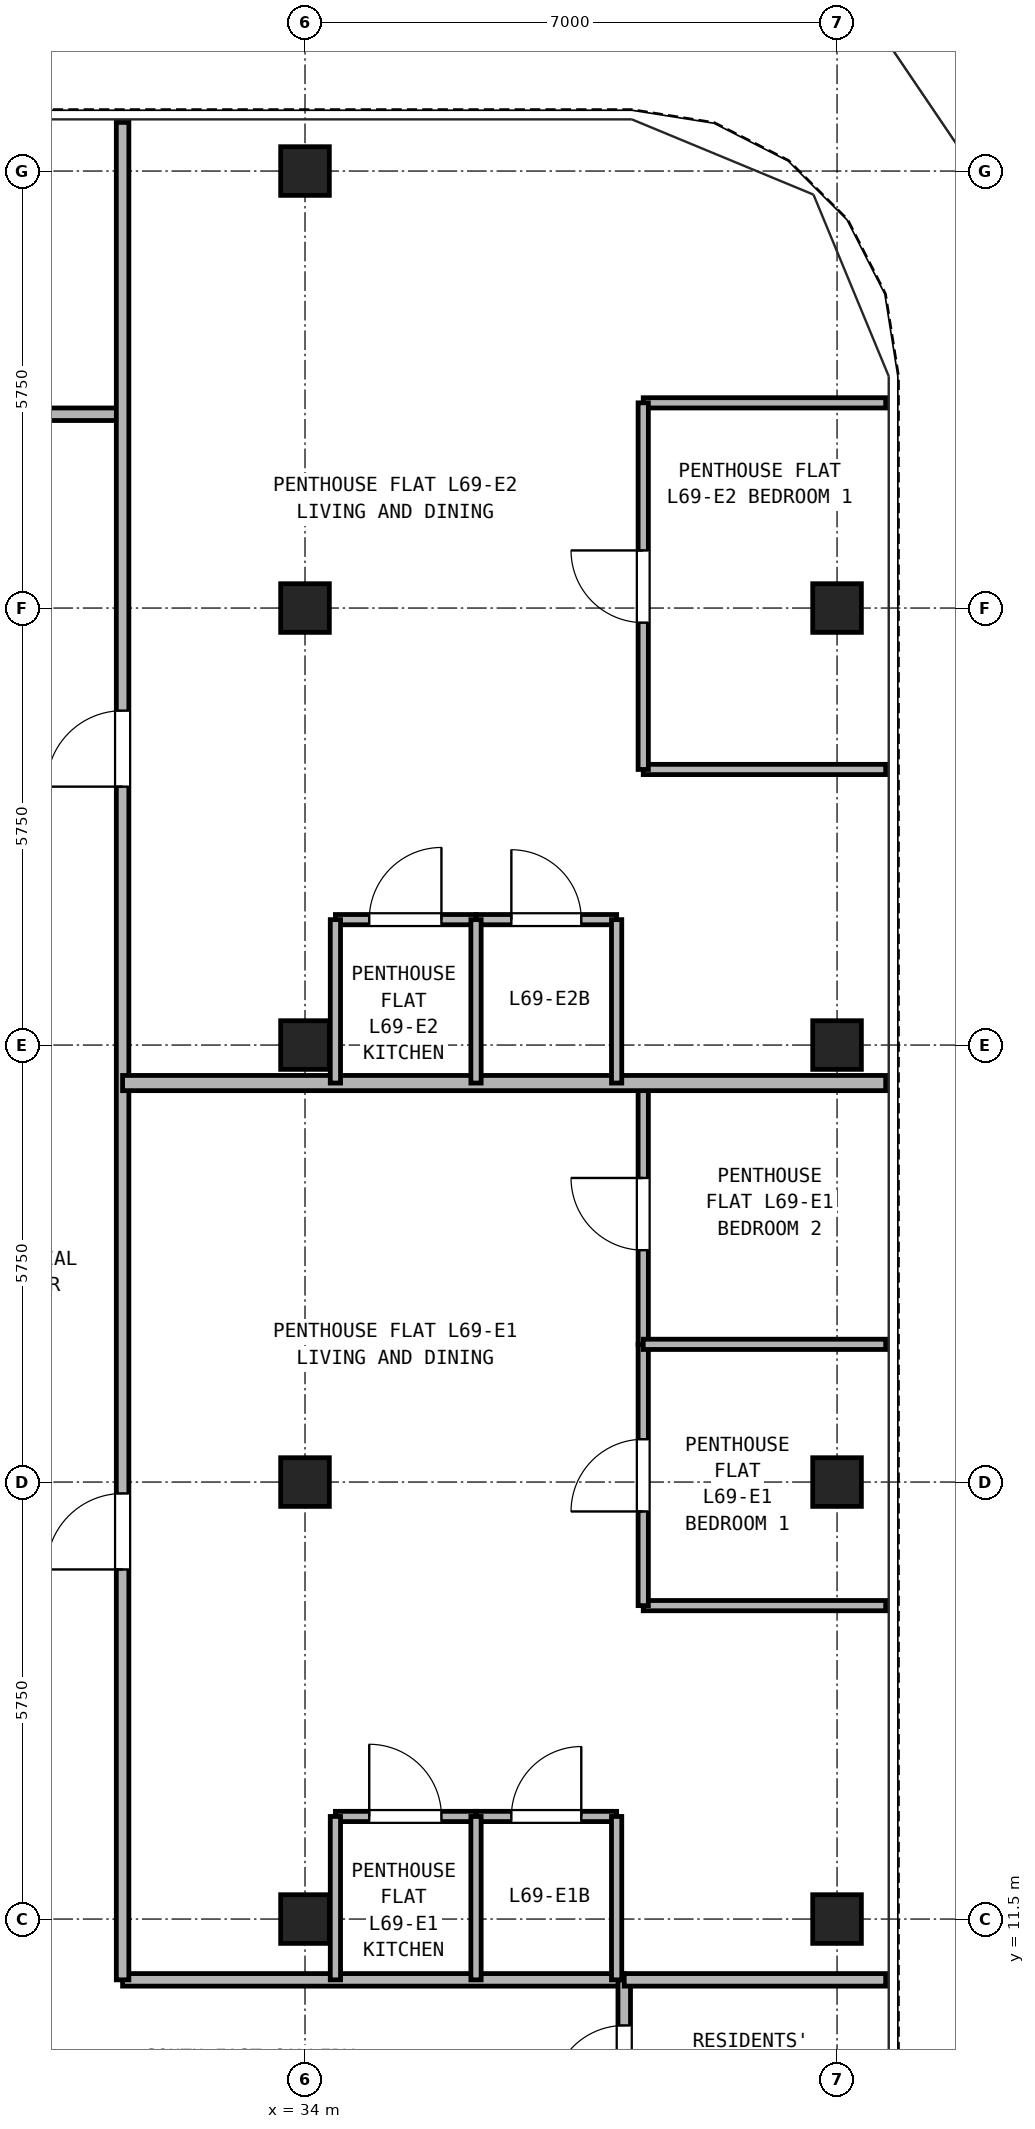
"""IFC4 building model, lengths in metres.
Left out: names, types, materials, properties, quantities, classifications, styles, units other than length and angle.
Written with IfcOpenShell. Run it as: python <this file> out.ifc"""

import sys

from ifc_helpers import new_model, si_unit, direction, frame, frame_2d, origin, origin_2d, place, context, subcontext, project, spatial, rectangle, hollow_rectangle, extrude, source, transform, mapped, element, fill, save


model = new_model("IFC4")
c1 = context("Model", 3, precision=1e-05, world=origin(), true_north=direction((0.0, 1.0)))
c2 = subcontext(c1, "Body", "Model", "MODEL_VIEW")
j1 = project(units=[si_unit("LENGTHUNIT", "METRE"), si_unit("PLANEANGLEUNIT", "RADIAN")], contexts=[c1])
p1 = place(None, origin())
s1 = spatial("IfcSite", under=j1, at=p1, CompositionType="ELEMENT")
p2 = place(p1, origin())
s2 = spatial("IfcBuilding", under=s1, at=p2, CompositionType="ELEMENT")
p3 = place(p2, frame((0.0, 0.0, 242.5)))
s3 = spatial("IfcBuildingStorey", under=s2, at=p3, CompositionType="ELEMENT", Elevation=242.5)
m1 = source(origin(), c2, "Body", "SweptSolid", [
    extrude(hollow_rectangle(XDim=0.64, YDim=0.64, WallThickness=0.035, at=origin_2d()), origin(), (0.0, 0.0, 1.0), 2.98),
])
for number, where, z_axis, x_axis in (
    (1, (34.0, 34.5, 0.0), (0.0, 0.0, 1.0), (1.0, 0.0, 0.0)),
    (2, (41.0, 11.5, 0.0), (0.0, 0.0, 1.0), (1.0, 0.0, 0.0)),
    (3, (41.0, 17.25, 0.0), (0.0, 0.0, 1.0), (1.0, 0.0, 0.0)),
    (4, (41.0, 23.0, 0.0), (0.0, 0.0, 1.0), (1.0, 0.0, 0.0)),
    (5, (41.0, 28.75, 0.0), (0.0, 0.0, 1.0), (1.0, 0.0, 0.0)),
    (6, (34.0, 11.5, 0.0), (0.0, 0.0, 1.0), (1.0, 0.0, 0.0)),
    (7, (34.0, 17.25, 0.0), (0.0, 0.0, 1.0), (1.0, 0.0, 0.0)),
    (8, (34.0, 23.0, 0.0), (0.0, 0.0, 1.0), (1.0, 0.0, 0.0)),
    (9, (34.0, 28.75, 0.0), (0.0, 0.0, 1.0), (1.0, 0.0, 0.0)),
):
    element("IfcColumn", number, at=place(p3, frame(where, z_axis=z_axis, x_axis=x_axis)), inside=s3, PredefinedType="COLUMN", context=c2, shape_type="MappedRepresentation", body=[
        mapped(m1, transform((0.0, 0.0, 0.0), x_axis=(1.0, 0.0, 0.0), y_axis=(0.0, 1.0, 0.0), z_axis=(0.0, 0.0, 1.0), scale=1.0)),
    ])
p4 = place(p3, frame((31.6, 10.7, 0.0), z_axis=(0.0, 0.0, 1.0), x_axis=(1.0, 0.0, 0.0)))
e10 = element("IfcWall", 10, at=p4, inside=s3, PredefinedType="PARTITIONING", context=c2, shape_type="SweptSolid", body=[
    extrude(rectangle(XDim=6.6, YDim=0.165, at=frame_2d((3.3, 0.0))), origin(), (0.0, 0.0, 1.0), 2.98),
])
p5 = place(p3, frame((38.2, 8.7, 0.0), z_axis=(0.0, 0.0, 1.0), x_axis=(0.0, 1.0, 0.0)))
e11 = element("IfcWall", 11, at=p5, inside=s3, PredefinedType="PARTITIONING", context=c2, shape_type="SweptSolid", body=[
    extrude(rectangle(XDim=2.0, YDim=0.165, at=frame_2d((1.0, 0.0))), origin(), (0.0, 0.0, 1.0), 2.98),
])
p6 = place(p5, frame((0.45, 0.0, 0.0)))
e12 = element("IfcOpeningElement", 12, at=p6, cuts=e11, PredefinedType="OPENING", context=c2, shape_type="SweptSolid", body=[
    extrude(rectangle(XDim=0.95, YDim=2.15, at=frame_2d((0.475, 1.075))), frame((0.0, 0.093, 0.0), z_axis=(0.0, -1.0, 0.0), x_axis=(1.0, 0.0, 0.0)), (0.0, 0.0, 1.0), 0.185),
])
p7 = place(p3, frame((15.4, 31.3, 0.0), z_axis=(0.0, 0.0, 1.0), x_axis=(1.0, 0.0, 0.0)))
e13 = element("IfcWall", 13, at=p7, inside=s3, PredefinedType="PARTITIONING", context=c2, shape_type="SweptSolid", body=[
    extrude(rectangle(XDim=16.2, YDim=0.165, at=frame_2d((8.1, 0.0))), origin(), (0.0, 0.0, 1.0), 2.98),
])
p8 = place(p7, frame((2.8, 0.0, 0.0)))
e14 = element("IfcOpeningElement", 14, at=p8, cuts=e13, PredefinedType="OPENING", context=c2, shape_type="SweptSolid", body=[
    extrude(rectangle(XDim=0.95, YDim=2.15, at=frame_2d((0.475, 1.075))), frame((0.0, 0.093, 0.0), z_axis=(0.0, -1.0, 0.0), x_axis=(1.0, 0.0, 0.0)), (0.0, 0.0, 1.0), 0.185),
])
p9 = place(p7, frame((8.15, 0.0, 0.0)))
e15 = element("IfcOpeningElement", 15, at=p9, cuts=e13, PredefinedType="OPENING", context=c2, shape_type="SweptSolid", body=[
    extrude(rectangle(XDim=0.95, YDim=2.15, at=frame_2d((0.475, 1.075))), frame((0.0, 0.093, 0.0), z_axis=(0.0, -1.0, 0.0), x_axis=(1.0, 0.0, 0.0)), (0.0, 0.0, 1.0), 0.185),
])
p10 = place(p7, frame((12.95, 0.0, 0.0)))
e16 = element("IfcOpeningElement", 16, at=p10, cuts=e13, PredefinedType="OPENING", context=c2, shape_type="SweptSolid", body=[
    extrude(rectangle(XDim=0.92, YDim=2.1, at=frame_2d((0.46, 1.05))), frame((0.0, 0.093, 0.0), z_axis=(0.0, -1.0, 0.0), x_axis=(1.0, 0.0, 0.0)), (0.0, 0.0, 1.0), 0.185),
])
p11 = place(p3, frame((31.6, 10.7, 0.0), z_axis=(0.0, 0.0, 1.0), x_axis=(0.0, 1.0, 0.0)))
e17 = element("IfcWall", 17, at=p11, inside=s3, PredefinedType="PARTITIONING", context=c2, shape_type="SweptSolid", body=[
    extrude(rectangle(XDim=24.44, YDim=0.165, at=frame_2d((12.22, 0.0))), origin(), (0.0, 0.0, 1.0), 2.98),
])
p12 = place(p11, frame((5.4, 0.0, 0.0)))
e18 = element("IfcOpeningElement", 18, at=p12, cuts=e17, PredefinedType="OPENING", context=c2, shape_type="SweptSolid", body=[
    extrude(rectangle(XDim=1.0, YDim=2.15, at=frame_2d((0.5, 1.075))), frame((0.0, 0.093, 0.0), z_axis=(0.0, -1.0, 0.0), x_axis=(1.0, 0.0, 0.0)), (0.0, 0.0, 1.0), 0.185),
])
p13 = place(p11, frame((15.7, 0.0, 0.0)))
e19 = element("IfcOpeningElement", 19, at=p13, cuts=e17, PredefinedType="OPENING", context=c2, shape_type="SweptSolid", body=[
    extrude(rectangle(XDim=1.0, YDim=2.15, at=frame_2d((0.5, 1.075))), frame((0.0, 0.093, 0.0), z_axis=(0.0, -1.0, 0.0), x_axis=(1.0, 0.0, 0.0)), (0.0, 0.0, 1.0), 0.185),
])
p14 = place(p3, frame((38.2, 10.7, 0.0), z_axis=(0.0, 0.0, 1.0), x_axis=(1.0, 0.0, 0.0)))
e20 = element("IfcWall", 20, at=p14, inside=s3, PredefinedType="PARTITIONING", context=c2, shape_type="SweptSolid", body=[
    extrude(rectangle(XDim=3.44, YDim=0.165, at=frame_2d((1.72, 0.0))), origin(), (0.0, 0.0, 1.0), 2.98),
])
p15 = place(p3, frame((34.4, 12.85, 0.0), z_axis=(0.0, 0.0, 1.0), x_axis=(1.0, 0.0, 0.0)))
e21 = element("IfcWall", 21, at=p15, inside=s3, PredefinedType="PARTITIONING", context=c2, shape_type="SweptSolid", body=[
    extrude(rectangle(XDim=1.85, YDim=0.135, at=frame_2d((0.925, 0.0))), origin(), (0.0, 0.0, 1.0), 2.98),
])
p16 = place(p15, frame((0.445, 0.0, 0.0)))
e22 = element("IfcOpeningElement", 22, at=p16, cuts=e21, PredefinedType="OPENING", context=c2, shape_type="SweptSolid", body=[
    extrude(rectangle(XDim=0.95, YDim=2.15, at=frame_2d((0.475, 1.075))), frame((0.0, 0.077, 0.0), z_axis=(0.0, -1.0, 0.0), x_axis=(1.0, 0.0, 0.0)), (0.0, 0.0, 1.0), 0.155),
])
p17 = place(p3, frame((36.25, 12.85, 0.0), z_axis=(0.0, 0.0, 1.0), x_axis=(1.0, 0.0, 0.0)))
e23 = element("IfcWall", 23, at=p17, inside=s3, PredefinedType="PARTITIONING", context=c2, shape_type="SweptSolid", body=[
    extrude(rectangle(XDim=1.85, YDim=0.135, at=frame_2d((0.925, 0.0))), origin(), (0.0, 0.0, 1.0), 2.98),
])
p18 = place(p17, frame((0.465, 0.0, 0.0)))
e24 = element("IfcOpeningElement", 24, at=p18, cuts=e23, PredefinedType="OPENING", context=c2, shape_type="SweptSolid", body=[
    extrude(rectangle(XDim=0.92, YDim=2.1, at=frame_2d((0.46, 1.05))), frame((0.0, 0.077, 0.0), z_axis=(0.0, -1.0, 0.0), x_axis=(1.0, 0.0, 0.0)), (0.0, 0.0, 1.0), 0.155),
])
for number, where, z_axis, x_axis in (
    (25, (34.4, 10.7, 0.0), (0.0, 0.0, 1.0), (0.0, 1.0, 0.0)),
    (26, (36.25, 10.7, 0.0), (0.0, 0.0, 1.0), (0.0, 1.0, 0.0)),
    (27, (38.1, 10.7, 0.0), (0.0, 0.0, 1.0), (0.0, 1.0, 0.0)),
):
    element("IfcWall", number, at=place(p3, frame(where, z_axis=z_axis, x_axis=x_axis)), inside=s3, PredefinedType="PARTITIONING", context=c2, shape_type="SweptSolid", body=[
        extrude(rectangle(XDim=2.15, YDim=0.135, at=frame_2d((1.075, 0.0))), origin(), (0.0, 0.0, 1.0), 2.98),
    ])
p19 = place(p3, frame((38.45, 15.624, 0.0), z_axis=(0.0, 0.0, 1.0), x_axis=(1.0, 0.0, 0.0)))
e28 = element("IfcWall", 28, at=p19, inside=s3, PredefinedType="PARTITIONING", context=c2, shape_type="SweptSolid", body=[
    extrude(rectangle(XDim=3.19, YDim=0.135, at=frame_2d((1.595, 0.0))), origin(), (0.0, 0.0, 1.0), 2.98),
])
p20 = place(p3, frame((38.45, 15.624, 0.0), z_axis=(0.0, 0.0, 1.0), x_axis=(0.0, 1.0, 0.0)))
e29 = element("IfcWall", 29, at=p20, inside=s3, PredefinedType="PARTITIONING", context=c2, shape_type="SweptSolid", body=[
    extrude(rectangle(XDim=3.438, YDim=0.135, at=frame_2d((1.719, 0.0))), origin(), (0.0, 0.0, 1.0), 2.98),
])
p21 = place(p20, frame((1.239, 0.0, 0.0)))
e30 = element("IfcOpeningElement", 30, at=p21, cuts=e29, PredefinedType="OPENING", context=c2, shape_type="SweptSolid", body=[
    extrude(rectangle(XDim=0.95, YDim=2.15, at=frame_2d((0.475, 1.075))), frame((0.0, 0.077, 0.0), z_axis=(0.0, -1.0, 0.0), x_axis=(1.0, 0.0, 0.0)), (0.0, 0.0, 1.0), 0.155),
])
p22 = place(p3, frame((38.45, 19.062, 0.0), z_axis=(0.0, 0.0, 1.0), x_axis=(0.0, 1.0, 0.0)))
e31 = element("IfcWall", 31, at=p22, inside=s3, PredefinedType="PARTITIONING", context=c2, shape_type="SweptSolid", body=[
    extrude(rectangle(XDim=3.438, YDim=0.135, at=frame_2d((1.719, 0.0))), origin(), (0.0, 0.0, 1.0), 2.98),
])
p23 = place(p22, frame((1.239, 0.0, 0.0)))
e32 = element("IfcOpeningElement", 32, at=p23, cuts=e31, PredefinedType="OPENING", context=c2, shape_type="SweptSolid", body=[
    extrude(rectangle(XDim=0.95, YDim=2.15, at=frame_2d((0.475, 1.075))), frame((0.0, 0.077, 0.0), z_axis=(0.0, -1.0, 0.0), x_axis=(1.0, 0.0, 0.0)), (0.0, 0.0, 1.0), 0.155),
])
p24 = place(p3, frame((38.45, 19.062, 0.0), z_axis=(0.0, 0.0, 1.0), x_axis=(1.0, 0.0, 0.0)))
e33 = element("IfcWall", 33, at=p24, inside=s3, PredefinedType="PARTITIONING", context=c2, shape_type="SweptSolid", body=[
    extrude(rectangle(XDim=3.19, YDim=0.135, at=frame_2d((1.595, 0.0))), origin(), (0.0, 0.0, 1.0), 2.98),
])
p25 = place(p3, frame((31.6, 22.5, 0.0), z_axis=(0.0, 0.0, 1.0), x_axis=(1.0, 0.0, 0.0)))
e34 = element("IfcWall", 34, at=p25, inside=s3, PredefinedType="PARTITIONING", context=c2, shape_type="SweptSolid", body=[
    extrude(rectangle(XDim=10.04, YDim=0.2, at=frame_2d((5.02, 0.0))), origin(), (0.0, 0.0, 1.0), 2.98),
])
p26 = place(p3, frame((34.4, 24.65, 0.0), z_axis=(0.0, 0.0, 1.0), x_axis=(1.0, 0.0, 0.0)))
e35 = element("IfcWall", 35, at=p26, inside=s3, PredefinedType="PARTITIONING", context=c2, shape_type="SweptSolid", body=[
    extrude(rectangle(XDim=1.85, YDim=0.135, at=frame_2d((0.925, 0.0))), origin(), (0.0, 0.0, 1.0), 2.98),
])
p27 = place(p26, frame((0.445, 0.0, 0.0)))
e36 = element("IfcOpeningElement", 36, at=p27, cuts=e35, PredefinedType="OPENING", context=c2, shape_type="SweptSolid", body=[
    extrude(rectangle(XDim=0.95, YDim=2.15, at=frame_2d((0.475, 1.075))), frame((0.0, 0.077, 0.0), z_axis=(0.0, -1.0, 0.0), x_axis=(1.0, 0.0, 0.0)), (0.0, 0.0, 1.0), 0.155),
])
p28 = place(p3, frame((36.25, 24.65, 0.0), z_axis=(0.0, 0.0, 1.0), x_axis=(1.0, 0.0, 0.0)))
e37 = element("IfcWall", 37, at=p28, inside=s3, PredefinedType="PARTITIONING", context=c2, shape_type="SweptSolid", body=[
    extrude(rectangle(XDim=1.85, YDim=0.135, at=frame_2d((0.925, 0.0))), origin(), (0.0, 0.0, 1.0), 2.98),
])
p29 = place(p28, frame((0.465, 0.0, 0.0)))
e38 = element("IfcOpeningElement", 38, at=p29, cuts=e37, PredefinedType="OPENING", context=c2, shape_type="SweptSolid", body=[
    extrude(rectangle(XDim=0.92, YDim=2.1, at=frame_2d((0.46, 1.05))), frame((0.0, 0.077, 0.0), z_axis=(0.0, -1.0, 0.0), x_axis=(1.0, 0.0, 0.0)), (0.0, 0.0, 1.0), 0.155),
])
for number, where, z_axis, x_axis in (
    (39, (34.4, 22.5, 0.0), (0.0, 0.0, 1.0), (0.0, 1.0, 0.0)),
    (40, (36.25, 22.5, 0.0), (0.0, 0.0, 1.0), (0.0, 1.0, 0.0)),
    (41, (38.1, 22.5, 0.0), (0.0, 0.0, 1.0), (0.0, 1.0, 0.0)),
):
    element("IfcWall", number, at=place(p3, frame(where, z_axis=z_axis, x_axis=x_axis)), inside=s3, PredefinedType="PARTITIONING", context=c2, shape_type="SweptSolid", body=[
        extrude(rectangle(XDim=2.15, YDim=0.135, at=frame_2d((1.075, 0.0))), origin(), (0.0, 0.0, 1.0), 2.98),
    ])
for number, where, z_axis, x_axis in (
    (42, (38.45, 26.626, 0.0), (0.0, 0.0, 1.0), (1.0, 0.0, 0.0)),
    (43, (38.45, 31.45, 0.0), (0.0, 0.0, 1.0), (1.0, 0.0, 0.0)),
):
    element("IfcWall", number, at=place(p3, frame(where, z_axis=z_axis, x_axis=x_axis)), inside=s3, PredefinedType="PARTITIONING", context=c2, shape_type="SweptSolid", body=[
        extrude(rectangle(XDim=3.19, YDim=0.135, at=frame_2d((1.595, 0.0))), origin(), (0.0, 0.0, 1.0), 2.98),
    ])
p30 = place(p3, frame((38.45, 26.626, 0.0), z_axis=(0.0, 0.0, 1.0), x_axis=(0.0, 1.0, 0.0)))
e44 = element("IfcWall", 44, at=p30, inside=s3, PredefinedType="PARTITIONING", context=c2, shape_type="SweptSolid", body=[
    extrude(rectangle(XDim=4.824, YDim=0.135, at=frame_2d((2.412, 0.0))), origin(), (0.0, 0.0, 1.0), 2.98),
])
p31 = place(p30, frame((1.932, 0.0, 0.0)))
e45 = element("IfcOpeningElement", 45, at=p31, cuts=e44, PredefinedType="OPENING", context=c2, shape_type="SweptSolid", body=[
    extrude(rectangle(XDim=0.95, YDim=2.15, at=frame_2d((0.475, 1.075))), frame((0.0, 0.077, 0.0), z_axis=(0.0, -1.0, 0.0), x_axis=(1.0, 0.0, 0.0)), (0.0, 0.0, 1.0), 0.155),
])
p32 = place(p6, origin())
e46 = element("IfcDoor", 46, at=p32, inside=s3, OperationType="SINGLE_SWING_LEFT", PredefinedType="DOOR", context=c2, shape_type="SweptSolid", body=[
    extrude(rectangle(XDim=0.95, YDim=2.15, at=frame_2d((0.475, 1.075))), frame((0.0, 0.025, 0.0), z_axis=(0.0, -1.0, 0.0), x_axis=(1.0, 0.0, 0.0)), (0.0, 0.0, 1.0), 0.05),
])
fill(e12, e46)
p33 = place(p16, origin())
e47 = element("IfcDoor", 47, at=p33, inside=s3, OperationType="SINGLE_SWING_LEFT", PredefinedType="DOOR", context=c2, shape_type="SweptSolid", body=[
    extrude(rectangle(XDim=0.95, YDim=2.15, at=frame_2d((0.475, 1.075))), frame((0.0, 0.025, 0.0), z_axis=(0.0, -1.0, 0.0), x_axis=(1.0, 0.0, 0.0)), (0.0, 0.0, 1.0), 0.05),
])
fill(e22, e47)
p34 = place(p18, origin())
e48 = element("IfcDoor", 48, at=p34, inside=s3, OperationType="SINGLE_SWING_RIGHT", PredefinedType="DOOR", context=c2, shape_type="SweptSolid", body=[
    extrude(rectangle(XDim=0.92, YDim=2.1, at=frame_2d((0.46, 1.05))), frame((0.0, 0.025, 0.0), z_axis=(0.0, -1.0, 0.0), x_axis=(1.0, 0.0, 0.0)), (0.0, 0.0, 1.0), 0.05),
])
fill(e24, e48)
p35 = place(p21, frame((0.95, 0.0, 0.0), z_axis=(0.0, 0.0, 1.0), x_axis=(-1.0, 0.0, 0.0)))
e49 = element("IfcDoor", 49, at=p35, inside=s3, OperationType="SINGLE_SWING_LEFT", PredefinedType="DOOR", context=c2, shape_type="SweptSolid", body=[
    extrude(rectangle(XDim=0.95, YDim=2.15, at=frame_2d((0.475, 1.075))), frame((0.0, 0.025, 0.0), z_axis=(0.0, -1.0, 0.0), x_axis=(1.0, 0.0, 0.0)), (0.0, 0.0, 1.0), 0.05),
])
fill(e30, e49)
p36 = place(p23, frame((0.95, 0.0, 0.0), z_axis=(0.0, 0.0, 1.0), x_axis=(-1.0, 0.0, 0.0)))
e50 = element("IfcDoor", 50, at=p36, inside=s3, OperationType="SINGLE_SWING_RIGHT", PredefinedType="DOOR", context=c2, shape_type="SweptSolid", body=[
    extrude(rectangle(XDim=0.95, YDim=2.15, at=frame_2d((0.475, 1.075))), frame((0.0, 0.025, 0.0), z_axis=(0.0, -1.0, 0.0), x_axis=(1.0, 0.0, 0.0)), (0.0, 0.0, 1.0), 0.05),
])
fill(e32, e50)
p37 = place(p12, frame((1.0, 0.0, 0.0), z_axis=(0.0, 0.0, 1.0), x_axis=(-1.0, 0.0, 0.0)))
e51 = element("IfcDoor", 51, at=p37, inside=s3, OperationType="SINGLE_SWING_LEFT", PredefinedType="DOOR", context=c2, shape_type="SweptSolid", body=[
    extrude(rectangle(XDim=1.0, YDim=2.15, at=frame_2d((0.5, 1.075))), frame((0.0, 0.025, 0.0), z_axis=(0.0, -1.0, 0.0), x_axis=(1.0, 0.0, 0.0)), (0.0, 0.0, 1.0), 0.05),
])
fill(e18, e51)
p38 = place(p27, origin())
e52 = element("IfcDoor", 52, at=p38, inside=s3, OperationType="SINGLE_SWING_RIGHT", PredefinedType="DOOR", context=c2, shape_type="SweptSolid", body=[
    extrude(rectangle(XDim=0.95, YDim=2.15, at=frame_2d((0.475, 1.075))), frame((0.0, 0.025, 0.0), z_axis=(0.0, -1.0, 0.0), x_axis=(1.0, 0.0, 0.0)), (0.0, 0.0, 1.0), 0.05),
])
fill(e36, e52)
p39 = place(p29, origin())
e53 = element("IfcDoor", 53, at=p39, inside=s3, OperationType="SINGLE_SWING_LEFT", PredefinedType="DOOR", context=c2, shape_type="SweptSolid", body=[
    extrude(rectangle(XDim=0.92, YDim=2.1, at=frame_2d((0.46, 1.05))), frame((0.0, 0.025, 0.0), z_axis=(0.0, -1.0, 0.0), x_axis=(1.0, 0.0, 0.0)), (0.0, 0.0, 1.0), 0.05),
])
fill(e38, e53)
p40 = place(p31, frame((0.95, 0.0, 0.0), z_axis=(0.0, 0.0, 1.0), x_axis=(-1.0, 0.0, 0.0)))
e54 = element("IfcDoor", 54, at=p40, inside=s3, OperationType="SINGLE_SWING_RIGHT", PredefinedType="DOOR", context=c2, shape_type="SweptSolid", body=[
    extrude(rectangle(XDim=0.95, YDim=2.15, at=frame_2d((0.475, 1.075))), frame((0.0, 0.025, 0.0), z_axis=(0.0, -1.0, 0.0), x_axis=(1.0, 0.0, 0.0)), (0.0, 0.0, 1.0), 0.05),
])
fill(e45, e54)
p41 = place(p13, frame((1.0, 0.0, 0.0), z_axis=(0.0, 0.0, 1.0), x_axis=(-1.0, 0.0, 0.0)))
e55 = element("IfcDoor", 55, at=p41, inside=s3, OperationType="SINGLE_SWING_LEFT", PredefinedType="DOOR", context=c2, shape_type="SweptSolid", body=[
    extrude(rectangle(XDim=1.0, YDim=2.15, at=frame_2d((0.5, 1.075))), frame((0.0, 0.025, 0.0), z_axis=(0.0, -1.0, 0.0), x_axis=(1.0, 0.0, 0.0)), (0.0, 0.0, 1.0), 0.05),
])
fill(e19, e55)
save(model, sys.argv[1])
